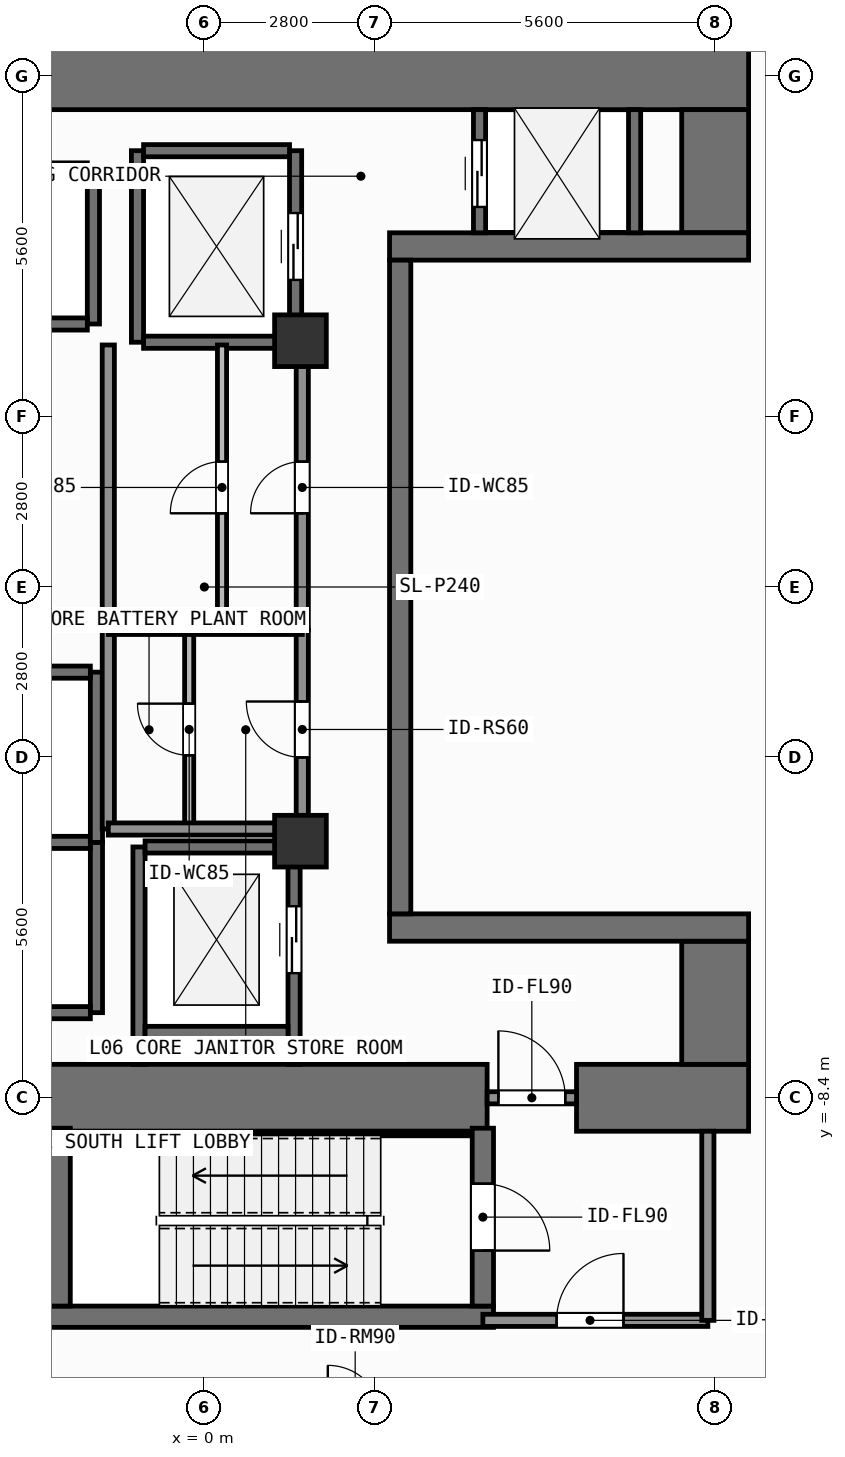
"""IFC4 building model, lengths in metres.
Left out: names, types, materials, properties, quantities, classifications, styles, units other than length and angle.
Written with IfcOpenShell. Run it as: python <this file> out.ifc"""

import sys

from ifc_helpers import new_model, si_unit, direction, frame, frame_2d, origin, origin_2d, place, context, subcontext, project, spatial, rectangle, extrude, element, fill, save


model = new_model("IFC4")
c1 = context("Model", 3, precision=1e-05, world=origin(), true_north=direction((0.0, 1.0)))
c2 = subcontext(c1, "Body", "Model", "MODEL_VIEW")
j1 = project(units=[si_unit("LENGTHUNIT", "METRE"), si_unit("PLANEANGLEUNIT", "RADIAN")], contexts=[c1])
p1 = place(None, origin())
s1 = spatial("IfcSite", under=j1, at=p1, CompositionType="ELEMENT")
p2 = place(p1, origin())
s2 = spatial("IfcBuilding", under=s1, at=p2, CompositionType="ELEMENT")
p3 = place(p2, frame((0.0, 0.0, 21.6)))
s3 = spatial("IfcBuildingStorey", under=s2, at=p3, CompositionType="ELEMENT", Elevation=21.6)
p4 = place(p3, frame((-2.62, -8.4, 0.0), z_axis=(0.0, 0.0, 1.0), x_axis=(1.0, 0.0, 0.0)))
e1 = element("IfcWall", 1, at=p4, inside=s3, PredefinedType="SHEAR", context=c2, shape_type="SweptSolid", body=[
    extrude(rectangle(XDim=7.27, YDim=1.1, at=frame_2d((3.635, 0.0))), origin(), (0.0, 0.0, 1.0), 4.8),
])
p5 = place(p3, frame((6.12, -8.4, 0.0), z_axis=(0.0, 0.0, 1.0), x_axis=(1.0, 0.0, 0.0)))
e2 = element("IfcWall", 2, at=p5, inside=s3, PredefinedType="SHEAR", context=c2, shape_type="SweptSolid", body=[
    extrude(rectangle(XDim=2.83, YDim=1.1, at=frame_2d((1.415, 0.0))), origin(), (0.0, 0.0, 1.0), 4.8),
])
p6 = place(p3, frame((-7.55, 8.4, 0.0), z_axis=(0.0, 0.0, 1.0), x_axis=(1.0, 0.0, 0.0)))
e3 = element("IfcWall", 3, at=p6, inside=s3, PredefinedType="SHEAR", context=c2, shape_type="SweptSolid", body=[
    extrude(rectangle(XDim=16.5, YDim=1.1, at=frame_2d((8.25, 0.0))), origin(), (0.0, 0.0, 1.0), 4.8),
])
for number, where, z_axis, x_axis in (
    (4, (8.4, -7.85, 0.0), (0.0, 0.0, 1.0), (0.0, 1.0, 0.0)),
    (5, (8.4, 5.825, 0.0), (0.0, 0.0, 1.0), (0.0, 1.0, 0.0)),
):
    element("IfcWall", number, at=place(p3, frame(where, z_axis=z_axis, x_axis=x_axis)), inside=s3, PredefinedType="SHEAR", context=c2, shape_type="SweptSolid", body=[
        extrude(rectangle(XDim=2.025, YDim=1.1, at=frame_2d((1.013, 0.0))), origin(), (0.0, 0.0, 1.0), 4.8),
    ])
for number, where, z_axis, x_axis in (
    (6, (3.045, -5.6, 0.0), (0.0, 0.0, 1.0), (1.0, 0.0, 0.0)),
    (7, (3.045, 5.6, 0.0), (0.0, 0.0, 1.0), (1.0, 0.0, 0.0)),
):
    element("IfcWall", number, at=place(p3, frame(where, z_axis=z_axis, x_axis=x_axis)), inside=s3, PredefinedType="SHEAR", context=c2, shape_type="SweptSolid", body=[
        extrude(rectangle(XDim=5.905, YDim=0.45, at=frame_2d((2.953, 0.0))), origin(), (0.0, 0.0, 1.0), 4.8),
    ])
p7 = place(p3, frame((3.22, -5.375, 0.0), z_axis=(0.0, 0.0, 1.0), x_axis=(0.0, 1.0, 0.0)))
e8 = element("IfcWall", 8, at=p7, inside=s3, PredefinedType="SHEAR", context=c2, shape_type="SweptSolid", body=[
    extrude(rectangle(XDim=10.75, YDim=0.35, at=frame_2d((5.375, 0.0))), origin(), (0.0, 0.0, 1.0), 4.8),
])
p8 = place(p3, frame((-2.555, -12.0, 0.0), z_axis=(0.0, 0.0, 1.0), x_axis=(1.0, 0.0, 0.0)))
e9 = element("IfcWall", 9, at=p8, inside=s3, PredefinedType="SHEAR", context=c2, shape_type="SweptSolid", body=[
    extrude(rectangle(XDim=7.31, YDim=0.35, at=frame_2d((3.655, 0.0))), origin(), (0.0, 0.0, 1.0), 4.8),
])
p9 = place(p3, frame((-2.2, -8.988, 0.0), z_axis=(0.0, 0.0, 1.0), x_axis=(1.0, 0.0, 0.0)))
e10 = element("IfcWall", 10, at=p9, inside=s3, PredefinedType="SHEAR", context=c2, shape_type="SweptSolid", body=[
    extrude(rectangle(XDim=6.6, YDim=0.075, at=frame_2d((3.3, 0.0))), origin(), (0.0, 0.0, 1.0), 4.8),
])
p10 = place(p3, frame((-2.38, -11.825, 0.0), z_axis=(0.0, 0.0, 1.0), x_axis=(0.0, 1.0, 0.0)))
e11 = element("IfcWall", 11, at=p10, inside=s3, PredefinedType="SHEAR", context=c2, shape_type="SweptSolid", body=[
    extrude(rectangle(XDim=2.925, YDim=0.35, at=frame_2d((1.462, 0.0))), origin(), (0.0, 0.0, 1.0), 4.8),
])
p11 = place(p3, frame((4.58, -8.9, 0.0), z_axis=(0.0, 0.0, 1.0), x_axis=(0.0, -1.0, 0.0)))
e12 = element("IfcWall", 12, at=p11, inside=s3, PredefinedType="SHEAR", context=c2, shape_type="SweptSolid", body=[
    extrude(rectangle(XDim=2.925, YDim=0.35, at=frame_2d((1.462, 0.0))), origin(), (0.0, 0.0, 1.0), 4.8),
])
p12 = place(p11, frame((0.913, 0.0, 0.0)))
e13 = element("IfcOpeningElement", 13, at=p12, cuts=e12, PredefinedType="OPENING", context=c2, shape_type="SweptSolid", body=[
    extrude(rectangle(XDim=1.1, YDim=2.15, at=frame_2d((0.55, 1.075))), frame((0.0, 0.185, 0.0), z_axis=(0.0, -1.0, 0.0), x_axis=(1.0, 0.0, 0.0)), (0.0, 0.0, 1.0), 0.37),
])
for number, where, z_axis, x_axis in (
    (14, (1.58, -4.18, 0.0), (0.0, 0.0, 1.0), (1.0, 0.0, 0.0)),
    (15, (1.58, 4.05, 0.0), (0.0, 0.0, 1.0), (1.0, 0.0, 0.0)),
):
    element("IfcColumn", number, at=place(p3, frame(where, z_axis=z_axis, x_axis=x_axis)), inside=s3, PredefinedType="COLUMN", context=c2, shape_type="SweptSolid", body=[
        extrude(rectangle(XDim=0.85, YDim=0.85, at=origin_2d()), origin(), (0.0, 0.0, 1.0), 4.8),
    ])
p13 = place(p3, frame((-1.825, 4.325, 0.0), z_axis=(0.0, 0.0, 1.0), x_axis=(0.0, 1.0, 0.0)))
e16 = element("IfcWall", 16, at=p13, inside=s3, PredefinedType="SHEAR", context=c2, shape_type="SweptSolid", body=[
    extrude(rectangle(XDim=2.55, YDim=0.2, at=frame_2d((1.275, 0.0))), origin(), (0.0, 0.0, 1.0), 4.48),
])
for number, where, z_axis, x_axis in (
    (17, (-4.275, 4.325, 0.0), (0.0, 0.0, 1.0), (1.0, 0.0, 0.0)),
    (18, (-4.275, 6.875, 0.0), (0.0, 0.0, 1.0), (1.0, 0.0, 0.0)),
):
    element("IfcWall", number, at=place(p3, frame(where, z_axis=z_axis, x_axis=x_axis)), inside=s3, PredefinedType="SHEAR", context=c2, shape_type="SweptSolid", body=[
        extrude(rectangle(XDim=2.35, YDim=0.2, at=frame_2d((1.175, 0.0))), origin(), (0.0, 0.0, 1.0), 4.48),
    ])
p14 = place(p3, frame((-1.775, -7.0, 0.0), z_axis=(0.0, 0.0, 1.0), x_axis=(0.0, 1.0, 0.0)))
e19 = element("IfcWall", 19, at=p14, inside=s3, PredefinedType="SHEAR", context=c2, shape_type="SweptSolid", body=[
    extrude(rectangle(XDim=2.8, YDim=0.2, at=frame_2d((1.4, 0.0))), origin(), (0.0, 0.0, 1.0), 4.48),
])
for number, where, z_axis, x_axis in (
    (20, (-4.325, -7.0, 0.0), (0.0, 0.0, 1.0), (1.0, 0.0, 0.0)),
    (21, (-4.325, -4.2, 0.0), (0.0, 0.0, 1.0), (1.0, 0.0, 0.0)),
):
    element("IfcWall", number, at=place(p3, frame(where, z_axis=z_axis, x_axis=x_axis)), inside=s3, PredefinedType="SHEAR", context=c2, shape_type="SweptSolid", body=[
        extrude(rectangle(XDim=2.45, YDim=0.2, at=frame_2d((1.225, 0.0))), origin(), (0.0, 0.0, 1.0), 4.48),
    ])
p15 = place(p3, frame((-1.775, -4.2, 0.0), z_axis=(0.0, 0.0, 1.0), x_axis=(0.0, 1.0, 0.0)))
e22 = element("IfcWall", 22, at=p15, inside=s3, PredefinedType="SHEAR", context=c2, shape_type="SweptSolid", body=[
    extrude(rectangle(XDim=2.8, YDim=0.2, at=frame_2d((1.4, 0.0))), origin(), (0.0, 0.0, 1.0), 4.48),
])
p16 = place(p3, frame((-4.325, -1.4, 0.0), z_axis=(0.0, 0.0, 1.0), x_axis=(1.0, 0.0, 0.0)))
e23 = element("IfcWall", 23, at=p16, inside=s3, PredefinedType="SHEAR", context=c2, shape_type="SweptSolid", body=[
    extrude(rectangle(XDim=2.45, YDim=0.2, at=frame_2d((1.225, 0.0))), origin(), (0.0, 0.0, 1.0), 4.48),
])
p17 = place(p3, frame((-1.1, 4.025, 0.0), z_axis=(0.0, 0.0, 1.0), x_axis=(0.0, 1.0, 0.0)))
e24 = element("IfcWall", 24, at=p17, inside=s3, PredefinedType="SHEAR", context=c2, shape_type="SweptSolid", body=[
    extrude(rectangle(XDim=3.15, YDim=0.2, at=frame_2d((1.575, 0.0))), origin(), (0.0, 0.0, 1.0), 4.48),
])
p18 = place(p3, frame((1.5, 4.025, 0.0), z_axis=(0.0, 0.0, 1.0), x_axis=(0.0, 1.0, 0.0)))
e25 = element("IfcWall", 25, at=p18, inside=s3, PredefinedType="SHEAR", context=c2, shape_type="SweptSolid", body=[
    extrude(rectangle(XDim=3.15, YDim=0.2, at=frame_2d((1.575, 0.0))), origin(), (0.0, 0.0, 1.0), 4.48),
])
p19 = place(p18, frame((1.025, 0.0, 0.0)))
e26 = element("IfcOpeningElement", 26, at=p19, cuts=e25, PredefinedType="OPENING", context=c2, shape_type="SweptSolid", body=[
    extrude(rectangle(XDim=1.1, YDim=2.2, at=frame_2d((0.55, 1.1))), frame((0.0, 0.11, 0.0), z_axis=(0.0, -1.0, 0.0), x_axis=(1.0, 0.0, 0.0)), (0.0, 0.0, 1.0), 0.22),
])
for number, where, z_axis, x_axis in (
    (27, (-1.0, 4.025, 0.0), (0.0, 0.0, 1.0), (1.0, 0.0, 0.0)),
    (28, (-1.0, 7.175, 0.0), (0.0, 0.0, 1.0), (1.0, 0.0, 0.0)),
):
    element("IfcWall", number, at=place(p3, frame(where, z_axis=z_axis, x_axis=x_axis)), inside=s3, PredefinedType="SHEAR", context=c2, shape_type="SweptSolid", body=[
        extrude(rectangle(XDim=2.4, YDim=0.2, at=frame_2d((1.2, 0.0))), origin(), (0.0, 0.0, 1.0), 4.48),
    ])
p20 = place(p3, frame((-1.075, -7.85, 0.0), z_axis=(0.0, 0.0, 1.0), x_axis=(0.0, 1.0, 0.0)))
e29 = element("IfcWall", 29, at=p20, inside=s3, PredefinedType="SHEAR", context=c2, shape_type="SweptSolid", body=[
    extrude(rectangle(XDim=3.575, YDim=0.2, at=frame_2d((1.788, 0.0))), origin(), (0.0, 0.0, 1.0), 4.48),
])
p21 = place(p3, frame((1.475, -7.85, 0.0), z_axis=(0.0, 0.0, 1.0), x_axis=(0.0, 1.0, 0.0)))
e30 = element("IfcWall", 30, at=p21, inside=s3, PredefinedType="SHEAR", context=c2, shape_type="SweptSolid", body=[
    extrude(rectangle(XDim=3.575, YDim=0.2, at=frame_2d((1.788, 0.0))), origin(), (0.0, 0.0, 1.0), 4.48),
])
p22 = place(p21, frame((1.5, 0.0, 0.0)))
e31 = element("IfcOpeningElement", 31, at=p22, cuts=e30, PredefinedType="OPENING", context=c2, shape_type="SweptSolid", body=[
    extrude(rectangle(XDim=1.1, YDim=2.2, at=frame_2d((0.55, 1.1))), frame((0.0, 0.11, 0.0), z_axis=(0.0, -1.0, 0.0), x_axis=(1.0, 0.0, 0.0)), (0.0, 0.0, 1.0), 0.22),
])
for number, where, z_axis, x_axis in (
    (32, (-0.975, -7.325, 0.0), (0.0, 0.0, 1.0), (1.0, 0.0, 0.0)),
    (33, (-0.975, -4.275, 0.0), (0.0, 0.0, 1.0), (1.0, 0.0, 0.0)),
):
    element("IfcWall", number, at=place(p3, frame(where, z_axis=z_axis, x_axis=x_axis)), inside=s3, PredefinedType="SHEAR", context=c2, shape_type="SweptSolid", body=[
        extrude(rectangle(XDim=2.35, YDim=0.2, at=frame_2d((1.175, 0.0))), origin(), (0.0, 0.0, 1.0), 4.48),
    ])
p23 = place(p3, frame((4.525, 5.825, 0.0), z_axis=(0.0, 0.0, 1.0), x_axis=(0.0, 1.0, 0.0)))
e34 = element("IfcWall", 34, at=p23, inside=s3, PredefinedType="SHEAR", context=c2, shape_type="SweptSolid", body=[
    extrude(rectangle(XDim=2.025, YDim=0.2, at=frame_2d((1.013, 0.0))), origin(), (0.0, 0.0, 1.0), 4.48),
])
p24 = place(p23, frame((0.425, 0.0, 0.0)))
e35 = element("IfcOpeningElement", 35, at=p24, cuts=e34, PredefinedType="OPENING", context=c2, shape_type="SweptSolid", body=[
    extrude(rectangle(XDim=1.1, YDim=2.2, at=frame_2d((0.55, 1.1))), frame((0.0, 0.11, 0.0), z_axis=(0.0, -1.0, 0.0), x_axis=(1.0, 0.0, 0.0)), (0.0, 0.0, 1.0), 0.22),
])
p25 = place(p3, frame((7.075, 5.825, 0.0), z_axis=(0.0, 0.0, 1.0), x_axis=(0.0, 1.0, 0.0)))
e36 = element("IfcWall", 36, at=p25, inside=s3, PredefinedType="SHEAR", context=c2, shape_type="SweptSolid", body=[
    extrude(rectangle(XDim=2.025, YDim=0.2, at=frame_2d((1.013, 0.0))), origin(), (0.0, 0.0, 1.0), 4.48),
])
p26 = place(p3, frame((4.58, -12.06, 0.0), z_axis=(0.0, 0.0, 1.0), x_axis=(1.0, 0.0, 0.0)))
e37 = element("IfcWall", 37, at=p26, inside=s3, PredefinedType="SOLIDWALL", context=c2, shape_type="SweptSolid", body=[
    extrude(rectangle(XDim=3.7, YDim=0.2, at=frame_2d((1.85, 0.0))), origin(), (0.0, 0.0, 1.0), 4.48),
])
p27 = place(p26, frame((1.212, 0.0, 0.0)))
e38 = element("IfcOpeningElement", 38, at=p27, cuts=e37, PredefinedType="OPENING", context=c2, shape_type="SweptSolid", body=[
    extrude(rectangle(XDim=1.1, YDim=2.15, at=frame_2d((0.55, 1.075))), frame((0.0, 0.11, 0.0), z_axis=(0.0, -1.0, 0.0), x_axis=(1.0, 0.0, 0.0)), (0.0, 0.0, 1.0), 0.22),
])
p28 = place(p3, frame((4.65, -8.4, 0.0), z_axis=(0.0, 0.0, 1.0), x_axis=(1.0, 0.0, 0.0)))
e39 = element("IfcWall", 39, at=p28, inside=s3, PredefinedType="SOLIDWALL", context=c2, shape_type="SweptSolid", body=[
    extrude(rectangle(XDim=1.47, YDim=0.2, at=frame_2d((0.735, 0.0))), origin(), (0.0, 0.0, 1.0), 3.52),
])
p29 = place(p28, frame((0.185, 0.0, 0.0)))
e40 = element("IfcOpeningElement", 40, at=p29, cuts=e39, PredefinedType="OPENING", context=c2, shape_type="SweptSolid", body=[
    extrude(rectangle(XDim=1.1, YDim=2.15, at=frame_2d((0.55, 1.075))), frame((0.0, 0.11, 0.0), z_axis=(0.0, -1.0, 0.0), x_axis=(1.0, 0.0, 0.0)), (0.0, 0.0, 1.0), 0.22),
])
p30 = place(p3, frame((-0.25, -3.98, 0.0), z_axis=(0.0, 0.0, 1.0), x_axis=(0.0, 1.0, 0.0)))
e41 = element("IfcWall", 41, at=p30, inside=s3, PredefinedType="PARTITIONING", context=c2, shape_type="SweptSolid", body=[
    extrude(rectangle(XDim=3.274, YDim=0.15, at=frame_2d((1.637, 0.0))), origin(), (0.0, 0.0, 1.0), 4.48),
])
p31 = place(p30, frame((1.212, 0.0, 0.0)))
e42 = element("IfcOpeningElement", 42, at=p31, cuts=e41, PredefinedType="OPENING", context=c2, shape_type="SweptSolid", body=[
    extrude(rectangle(XDim=0.85, YDim=2.1, at=frame_2d((0.425, 1.05))), frame((0.0, 0.085, 0.0), z_axis=(0.0, -1.0, 0.0), x_axis=(1.0, 0.0, 0.0)), (0.0, 0.0, 1.0), 0.17),
])
p32 = place(p3, frame((0.29, -0.706, 0.0), z_axis=(0.0, 0.0, 1.0), x_axis=(0.0, 1.0, 0.0)))
e43 = element("IfcWall", 43, at=p32, inside=s3, PredefinedType="PARTITIONING", context=c2, shape_type="SweptSolid", body=[
    extrude(rectangle(XDim=4.686, YDim=0.15, at=frame_2d((2.343, 0.0))), origin(), (0.0, 0.0, 1.0), 4.48),
])
p33 = place(p32, frame((1.918, 0.0, 0.0)))
e44 = element("IfcOpeningElement", 44, at=p33, cuts=e43, PredefinedType="OPENING", context=c2, shape_type="SweptSolid", body=[
    extrude(rectangle(XDim=0.85, YDim=2.1, at=frame_2d((0.425, 1.05))), frame((0.0, 0.085, 0.0), z_axis=(0.0, -1.0, 0.0), x_axis=(1.0, 0.0, 0.0)), (0.0, 0.0, 1.0), 0.17),
])
p34 = place(p3, frame((1.61, -3.98, 0.0), z_axis=(0.0, 0.0, 1.0), x_axis=(0.0, 1.0, 0.0)))
e45 = element("IfcWall", 45, at=p34, inside=s3, PredefinedType="SOLIDWALL", context=c2, shape_type="SweptSolid", body=[
    extrude(rectangle(XDim=3.274, YDim=0.2, at=frame_2d((1.637, 0.0))), origin(), (0.0, 0.0, 1.0), 4.48),
])
p35 = place(p34, frame((1.177, 0.0, 0.0)))
e46 = element("IfcOpeningElement", 46, at=p35, cuts=e45, PredefinedType="OPENING", context=c2, shape_type="SweptSolid", body=[
    extrude(rectangle(XDim=0.92, YDim=2.1, at=frame_2d((0.46, 1.05))), frame((0.0, 0.11, 0.0), z_axis=(0.0, -1.0, 0.0), x_axis=(1.0, 0.0, 0.0)), (0.0, 0.0, 1.0), 0.22),
])
p36 = place(p3, frame((1.61, -0.706, 0.0), z_axis=(0.0, 0.0, 1.0), x_axis=(0.0, 1.0, 0.0)))
e47 = element("IfcWall", 47, at=p36, inside=s3, PredefinedType="SOLIDWALL", context=c2, shape_type="SweptSolid", body=[
    extrude(rectangle(XDim=4.686, YDim=0.2, at=frame_2d((2.343, 0.0))), origin(), (0.0, 0.0, 1.0), 4.48),
])
p37 = place(p36, frame((1.918, 0.0, 0.0)))
e48 = element("IfcOpeningElement", 48, at=p37, cuts=e47, PredefinedType="OPENING", context=c2, shape_type="SweptSolid", body=[
    extrude(rectangle(XDim=0.85, YDim=2.1, at=frame_2d((0.425, 1.05))), frame((0.0, 0.11, 0.0), z_axis=(0.0, -1.0, 0.0), x_axis=(1.0, 0.0, 0.0)), (0.0, 0.0, 1.0), 0.22),
])
p38 = place(p3, frame((8.28, -12.06, 0.0), z_axis=(0.0, 0.0, 1.0), x_axis=(0.0, 1.0, 0.0)))
e49 = element("IfcWall", 49, at=p38, inside=s3, PredefinedType="SOLIDWALL", context=c2, shape_type="SweptSolid", body=[
    extrude(rectangle(XDim=3.11, YDim=0.2, at=frame_2d((1.555, 0.0))), origin(), (0.0, 0.0, 1.0), 4.48),
])
p39 = place(p3, frame((-1.58, -3.98, 0.0), z_axis=(0.0, 0.0, 1.0), x_axis=(0.0, 1.0, 0.0)))
e50 = element("IfcWall", 50, at=p39, inside=s3, PredefinedType="SOLIDWALL", context=c2, shape_type="SweptSolid", body=[
    extrude(rectangle(XDim=7.96, YDim=0.2, at=frame_2d((3.98, 0.0))), origin(), (0.0, 0.0, 1.0), 4.48),
])
p40 = place(p3, frame((-1.58, -3.98, 0.0), z_axis=(0.0, 0.0, 1.0), x_axis=(1.0, 0.0, 0.0)))
e51 = element("IfcWall", 51, at=p40, inside=s3, PredefinedType="SOLIDWALL", context=c2, shape_type="SweptSolid", body=[
    extrude(rectangle(XDim=3.19, YDim=0.2, at=frame_2d((1.595, 0.0))), origin(), (0.0, 0.0, 1.0), 4.48),
])
p41 = place(p3, frame((-1.58, -0.706, 0.0), z_axis=(0.0, 0.0, 1.0), x_axis=(1.0, 0.0, 0.0)))
e52 = element("IfcWall", 52, at=p41, inside=s3, PredefinedType="PARTITIONING", context=c2, shape_type="SweptSolid", body=[
    extrude(rectangle(XDim=3.19, YDim=0.15, at=frame_2d((1.595, 0.0))), origin(), (0.0, 0.0, 1.0), 4.48),
])
p42 = place(p19, origin())
e53 = element("IfcDoor", 53, at=p42, inside=s3, OperationType="SLIDING_TO_LEFT", PredefinedType="DOOR", context=c2, shape_type="SweptSolid", body=[
    extrude(rectangle(XDim=1.1, YDim=2.2, at=frame_2d((0.55, 1.1))), frame((0.0, 0.025, 0.0), z_axis=(0.0, -1.0, 0.0), x_axis=(1.0, 0.0, 0.0)), (0.0, 0.0, 1.0), 0.05),
])
fill(e26, e53)
p43 = place(p22, origin())
e54 = element("IfcDoor", 54, at=p43, inside=s3, OperationType="SLIDING_TO_LEFT", PredefinedType="DOOR", context=c2, shape_type="SweptSolid", body=[
    extrude(rectangle(XDim=1.1, YDim=2.2, at=frame_2d((0.55, 1.1))), frame((0.0, 0.025, 0.0), z_axis=(0.0, -1.0, 0.0), x_axis=(1.0, 0.0, 0.0)), (0.0, 0.0, 1.0), 0.05),
])
fill(e31, e54)
p44 = place(p24, origin())
e55 = element("IfcDoor", 55, at=p44, inside=s3, OperationType="SLIDING_TO_LEFT", PredefinedType="DOOR", context=c2, shape_type="SweptSolid", body=[
    extrude(rectangle(XDim=1.1, YDim=2.2, at=frame_2d((0.55, 1.1))), frame((0.0, 0.025, 0.0), z_axis=(0.0, -1.0, 0.0), x_axis=(1.0, 0.0, 0.0)), (0.0, 0.0, 1.0), 0.05),
])
fill(e35, e55)
p45 = place(p12, origin())
e56 = element("IfcDoor", 56, at=p45, inside=s3, OperationType="SINGLE_SWING_RIGHT", PredefinedType="DOOR", context=c2, shape_type="SweptSolid", body=[
    extrude(rectangle(XDim=1.1, YDim=2.15, at=frame_2d((0.55, 1.075))), frame((0.0, 0.025, 0.0), z_axis=(0.0, -1.0, 0.0), x_axis=(1.0, 0.0, 0.0)), (0.0, 0.0, 1.0), 0.05),
])
fill(e13, e56)
p46 = place(p27, origin())
e57 = element("IfcDoor", 57, at=p46, inside=s3, OperationType="SINGLE_SWING_RIGHT", PredefinedType="DOOR", context=c2, shape_type="SweptSolid", body=[
    extrude(rectangle(XDim=1.1, YDim=2.15, at=frame_2d((0.55, 1.075))), frame((0.0, 0.025, 0.0), z_axis=(0.0, -1.0, 0.0), x_axis=(1.0, 0.0, 0.0)), (0.0, 0.0, 1.0), 0.05),
])
fill(e38, e57)
p47 = place(p29, origin())
e58 = element("IfcDoor", 58, at=p47, inside=s3, OperationType="SINGLE_SWING_LEFT", PredefinedType="DOOR", context=c2, shape_type="SweptSolid", body=[
    extrude(rectangle(XDim=1.1, YDim=2.15, at=frame_2d((0.55, 1.075))), frame((0.0, 0.025, 0.0), z_axis=(0.0, -1.0, 0.0), x_axis=(1.0, 0.0, 0.0)), (0.0, 0.0, 1.0), 0.05),
])
fill(e40, e58)
p48 = place(p31, origin())
e59 = element("IfcDoor", 59, at=p48, inside=s3, OperationType="SINGLE_SWING_RIGHT", PredefinedType="DOOR", context=c2, shape_type="SweptSolid", body=[
    extrude(rectangle(XDim=0.85, YDim=2.1, at=frame_2d((0.425, 1.05))), frame((0.0, 0.025, 0.0), z_axis=(0.0, -1.0, 0.0), x_axis=(1.0, 0.0, 0.0)), (0.0, 0.0, 1.0), 0.05),
])
fill(e42, e59)
p49 = place(p33, origin())
e60 = element("IfcDoor", 60, at=p49, inside=s3, OperationType="SINGLE_SWING_LEFT", PredefinedType="DOOR", context=c2, shape_type="SweptSolid", body=[
    extrude(rectangle(XDim=0.85, YDim=2.1, at=frame_2d((0.425, 1.05))), frame((0.0, 0.025, 0.0), z_axis=(0.0, -1.0, 0.0), x_axis=(1.0, 0.0, 0.0)), (0.0, 0.0, 1.0), 0.05),
])
fill(e44, e60)
p50 = place(p35, origin())
e61 = element("IfcDoor", 61, at=p50, inside=s3, OperationType="SINGLE_SWING_RIGHT", PredefinedType="DOOR", context=c2, shape_type="SweptSolid", body=[
    extrude(rectangle(XDim=0.92, YDim=2.1, at=frame_2d((0.46, 1.05))), frame((0.0, 0.025, 0.0), z_axis=(0.0, -1.0, 0.0), x_axis=(1.0, 0.0, 0.0)), (0.0, 0.0, 1.0), 0.05),
])
fill(e46, e61)
p51 = place(p37, origin())
e62 = element("IfcDoor", 62, at=p51, inside=s3, OperationType="SINGLE_SWING_LEFT", PredefinedType="DOOR", context=c2, shape_type="SweptSolid", body=[
    extrude(rectangle(XDim=0.85, YDim=2.1, at=frame_2d((0.425, 1.05))), frame((0.0, 0.025, 0.0), z_axis=(0.0, -1.0, 0.0), x_axis=(1.0, 0.0, 0.0)), (0.0, 0.0, 1.0), 0.05),
])
fill(e48, e62)
save(model, sys.argv[1])
